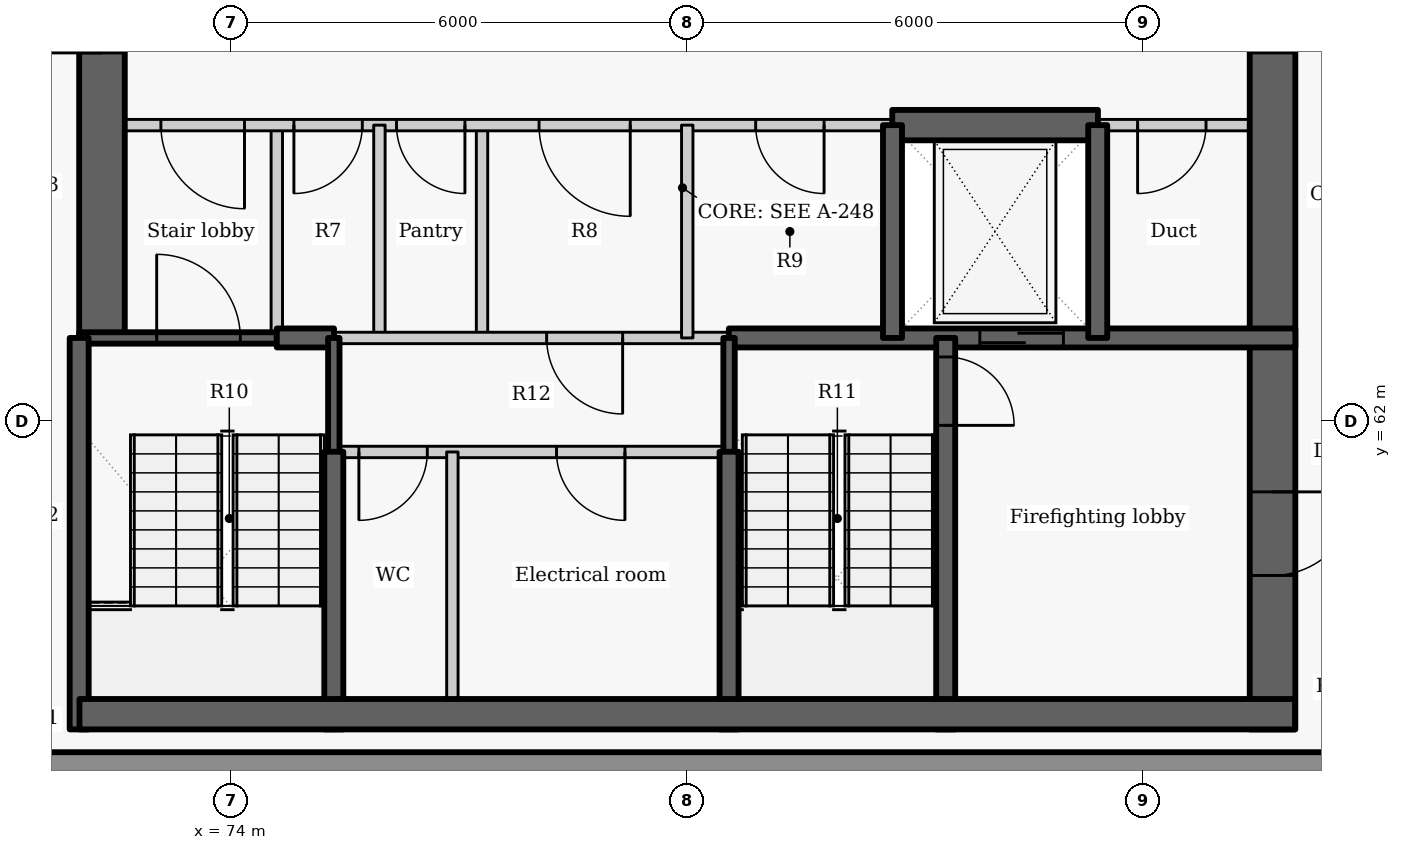
"""IFC4 building model, lengths in metres.
Left out: names, types, materials, properties, quantities, classifications, styles, units other than length and angle.
Written with IfcOpenShell. Run it as: python <this file> out.ifc"""

import sys

from ifc_helpers import new_model, si_unit, direction, frame, frame_2d, origin, place, context, subcontext, project, spatial, rectangle, extrude, element, fill, save


model = new_model("IFC4")
c1 = context("Model", 3, precision=1e-05, world=origin(), true_north=direction((0.0, 1.0)))
c2 = subcontext(c1, "Body", "Model", "MODEL_VIEW")
j1 = project(units=[si_unit("LENGTHUNIT", "METRE"), si_unit("PLANEANGLEUNIT", "RADIAN")], contexts=[c1])
p1 = place(None, origin())
s1 = spatial("IfcSite", under=j1, at=p1, CompositionType="ELEMENT")
p2 = place(p1, origin())
s2 = spatial("IfcBuilding", under=s1, at=p2, CompositionType="ELEMENT")
p3 = place(p2, frame((0.0, 0.0, 283.2)))
s3 = spatial("IfcBuildingStorey", under=s2, at=p3, CompositionType="ELEMENT", Elevation=283.2)
p4 = place(p3, frame((70.451, 57.5, 0.0), z_axis=(0.0, 0.0, 1.0), x_axis=(1.0, 0.0, 0.0)))
e1 = element("IfcWall", 1, at=p4, inside=s3, PredefinedType="SOLIDWALL", context=c2, shape_type="SweptSolid", body=[
    extrude(rectangle(XDim=19.093, YDim=0.3, at=frame_2d((9.546, 0.0))), origin(), (0.0, 0.0, 1.0), 2.725),
])
p5 = place(p3, frame((74.6, 63.1, 0.0), z_axis=(0.0, 0.0, 1.0), x_axis=(0.0, 1.0, 0.0)))
e2 = element("IfcWall", 2, at=p5, inside=s3, PredefinedType="PARTITIONING", context=c2, shape_type="SweptSolid", body=[
    extrude(rectangle(XDim=2.8, YDim=0.15, at=frame_2d((1.4, 0.0))), origin(), (0.0, 0.0, 1.0), 3.325),
])
p6 = place(p3, frame((72.3, 63.1, -0.275), z_axis=(0.0, 0.0, 1.0), x_axis=(0.0, 1.0, 0.0)))
e3 = element("IfcWall", 3, at=p6, inside=s3, PredefinedType="SHEAR", context=c2, shape_type="SweptSolid", body=[
    extrude(rectangle(XDim=9.1, YDim=0.6, at=frame_2d((4.55, 0.0))), origin(), (0.0, 0.0, 1.0), 3.6),
])
p7 = place(p6, frame((3.75, 0.0, 0.275)))
e4 = element("IfcOpeningElement", 4, at=p7, cuts=e3, PredefinedType="OPENING", context=c2, shape_type="SweptSolid", body=[
    extrude(rectangle(XDim=1.5, YDim=2.1, at=frame_2d((0.75, 1.05))), frame((0.0, 0.31, 0.0), z_axis=(0.0, -1.0, 0.0), x_axis=(1.0, 0.0, 0.0)), (0.0, 0.0, 1.0), 0.62),
])
p8 = place(p3, frame((77.3, 63.1, 0.0), z_axis=(0.0, 0.0, 1.0), x_axis=(0.0, 1.0, 0.0)))
e5 = element("IfcWall", 5, at=p8, inside=s3, PredefinedType="PARTITIONING", context=c2, shape_type="SweptSolid", body=[
    extrude(rectangle(XDim=2.8, YDim=0.15, at=frame_2d((1.4, 0.0))), origin(), (0.0, 0.0, 1.0), 3.325),
])
p9 = place(p3, frame((82.703, 65.9, 0.0), z_axis=(0.0, 0.0, 1.0), x_axis=(-1.0, 0.0, 0.0)))
e6 = element("IfcWall", 6, at=p9, inside=s3, PredefinedType="PARTITIONING", context=c2, shape_type="SweptSolid", body=[
    extrude(rectangle(XDim=10.703, YDim=0.15, at=frame_2d((5.352, 0.0))), origin(), (0.0, 0.0, 1.0), 3.325),
])
p10 = place(p9, frame((8.528, 0.0, 0.0)))
e7 = element("IfcOpeningElement", 7, at=p10, cuts=e6, PredefinedType="OPENING", context=c2, shape_type="SweptSolid", body=[
    extrude(rectangle(XDim=1.1, YDim=2.1, at=frame_2d((0.55, 1.05))), frame((0.0, 0.085, 0.0), z_axis=(0.0, -1.0, 0.0), x_axis=(1.0, 0.0, 0.0)), (0.0, 0.0, 1.0), 0.17),
])
p11 = place(p9, frame((6.978, 0.0, 0.0)))
e8 = element("IfcOpeningElement", 8, at=p11, cuts=e6, PredefinedType="OPENING", context=c2, shape_type="SweptSolid", body=[
    extrude(rectangle(XDim=0.9, YDim=2.1, at=frame_2d((0.45, 1.05))), frame((0.0, 0.085, 0.0), z_axis=(0.0, -1.0, 0.0), x_axis=(1.0, 0.0, 0.0)), (0.0, 0.0, 1.0), 0.17),
])
p12 = place(p9, frame((5.628, 0.0, 0.0)))
e9 = element("IfcOpeningElement", 9, at=p12, cuts=e6, PredefinedType="OPENING", context=c2, shape_type="SweptSolid", body=[
    extrude(rectangle(XDim=0.9, YDim=2.1, at=frame_2d((0.45, 1.05))), frame((0.0, 0.085, 0.0), z_axis=(0.0, -1.0, 0.0), x_axis=(1.0, 0.0, 0.0)), (0.0, 0.0, 1.0), 0.17),
])
p13 = place(p9, frame((3.453, 0.0, 0.0)))
e10 = element("IfcOpeningElement", 10, at=p13, cuts=e6, PredefinedType="OPENING", context=c2, shape_type="SweptSolid", body=[
    extrude(rectangle(XDim=1.2, YDim=2.1, at=frame_2d((0.6, 1.05))), frame((0.0, 0.085, 0.0), z_axis=(0.0, -1.0, 0.0), x_axis=(1.0, 0.0, 0.0)), (0.0, 0.0, 1.0), 0.17),
])
p14 = place(p9, frame((0.903, 0.0, 0.0)))
e11 = element("IfcOpeningElement", 11, at=p14, cuts=e6, PredefinedType="OPENING", context=c2, shape_type="SweptSolid", body=[
    extrude(rectangle(XDim=0.9, YDim=2.1, at=frame_2d((0.45, 1.05))), frame((0.0, 0.085, 0.0), z_axis=(0.0, -1.0, 0.0), x_axis=(1.0, 0.0, 0.0)), (0.0, 0.0, 1.0), 0.17),
])
p15 = place(p3, frame((88.0, 65.9, 0.0), z_axis=(0.0, 0.0, 1.0), x_axis=(-1.0, 0.0, 0.0)))
e12 = element("IfcWall", 12, at=p15, inside=s3, PredefinedType="PARTITIONING", context=c2, shape_type="SweptSolid", body=[
    extrude(rectangle(XDim=2.603, YDim=0.15, at=frame_2d((1.302, 0.0))), origin(), (0.0, 0.0, 1.0), 3.325),
])
p16 = place(p15, frame((1.175, 0.0, 0.0)))
e13 = element("IfcOpeningElement", 13, at=p16, cuts=e12, PredefinedType="OPENING", context=c2, shape_type="SweptSolid", body=[
    extrude(rectangle(XDim=0.9, YDim=2.1, at=frame_2d((0.45, 1.05))), frame((0.0, 0.085, 0.0), z_axis=(0.0, -1.0, 0.0), x_axis=(1.0, 0.0, 0.0)), (0.0, 0.0, 1.0), 0.17),
])
p17 = place(p3, frame((82.697, 65.9, -0.275), z_axis=(0.0, 0.0, 1.0), x_axis=(1.0, 0.0, 0.0)))
e14 = element("IfcWall", 14, at=p17, inside=s3, PredefinedType="SHEAR", context=c2, shape_type="SweptSolid", body=[
    extrude(rectangle(XDim=2.706, YDim=0.4, at=frame_2d((1.353, 0.0))), origin(), (0.0, 0.0, 1.0), 3.6),
])
p18 = place(p3, frame((87.7, 69.3, -0.275), z_axis=(0.0, 0.0, 1.0), x_axis=(0.0, -1.0, 0.0)))
e15 = element("IfcWall", 15, at=p18, inside=s3, PredefinedType="SHEAR", context=c2, shape_type="SweptSolid", body=[
    extrude(rectangle(XDim=11.35, YDim=0.6, at=frame_2d((5.675, 0.0))), origin(), (0.0, 0.0, 1.0), 3.6),
])
p19 = place(p18, frame((0.95, 0.0, 0.275)))
e16 = element("IfcOpeningElement", 16, at=p19, cuts=e15, PredefinedType="OPENING", context=c2, shape_type="SweptSolid", body=[
    extrude(rectangle(XDim=1.5, YDim=2.1, at=frame_2d((0.75, 1.05))), frame((0.0, 0.31, 0.0), z_axis=(0.0, -1.0, 0.0), x_axis=(1.0, 0.0, 0.0)), (0.0, 0.0, 1.0), 0.62),
])
p20 = place(p18, frame((8.225, 0.0, 0.275)))
e17 = element("IfcOpeningElement", 17, at=p20, cuts=e15, PredefinedType="OPENING", context=c2, shape_type="SweptSolid", body=[
    extrude(rectangle(XDim=1.1, YDim=2.1, at=frame_2d((0.55, 1.05))), frame((0.0, 0.31, 0.0), z_axis=(0.0, -1.0, 0.0), x_axis=(1.0, 0.0, 0.0)), (0.0, 0.0, 1.0), 0.62),
])
p21 = place(p3, frame((72.0, 63.1, -0.275), z_axis=(0.0, 0.0, 1.0), x_axis=(1.0, 0.0, 0.0)))
e18 = element("IfcWall", 18, at=p21, inside=s3, PredefinedType="SHEAR", context=c2, shape_type="SweptSolid", body=[
    extrude(rectangle(XDim=2.6, YDim=0.15, at=frame_2d((1.3, 0.0))), origin(), (0.0, 0.0, 1.0), 3.6),
])
p22 = place(p21, frame((1.02, 0.0, 0.275)))
e19 = element("IfcOpeningElement", 19, at=p22, cuts=e18, PredefinedType="OPENING", context=c2, shape_type="SweptSolid", body=[
    extrude(rectangle(XDim=1.1, YDim=2.1, at=frame_2d((0.55, 1.05))), frame((0.0, 0.085, 0.0), z_axis=(0.0, -1.0, 0.0), x_axis=(1.0, 0.0, 0.0)), (0.0, 0.0, 1.0), 0.17),
])
p23 = place(p3, frame((75.95, 63.1, 0.0), z_axis=(0.0, 0.0, 1.0), x_axis=(0.0, 1.0, 0.0)))
e20 = element("IfcWall", 20, at=p23, inside=s3, PredefinedType="PARTITIONING", context=c2, shape_type="SweptSolid", body=[
    extrude(rectangle(XDim=2.8, YDim=0.15, at=frame_2d((1.4, 0.0))), origin(), (0.0, 0.0, 1.0), 3.325),
])
p24 = place(p3, frame((74.6, 63.1, -0.275), z_axis=(0.0, 0.0, 1.0), x_axis=(1.0, 0.0, 0.0)))
e21 = element("IfcWall", 21, at=p24, inside=s3, PredefinedType="SHEAR", context=c2, shape_type="SweptSolid", body=[
    extrude(rectangle(XDim=0.753, YDim=0.25, at=frame_2d((0.376, 0.0))), origin(), (0.0, 0.0, 1.0), 3.6),
])
p25 = place(p3, frame((80.547, 63.1, -0.275), z_axis=(0.0, 0.0, 1.0), x_axis=(1.0, 0.0, 0.0)))
e22 = element("IfcWall", 22, at=p25, inside=s3, PredefinedType="SHEAR", context=c2, shape_type="SweptSolid", body=[
    extrude(rectangle(XDim=7.453, YDim=0.25, at=frame_2d((3.727, 0.0))), origin(), (0.0, 0.0, 1.0), 3.6),
])
p26 = place(p25, frame((3.302, 0.0, 0.275)))
e23 = element("IfcOpeningElement", 23, at=p26, cuts=e22, PredefinedType="OPENING", context=c2, shape_type="SweptSolid", body=[
    extrude(rectangle(XDim=1.1, YDim=2.1, at=frame_2d((0.55, 1.05))), frame((0.0, 0.135, 0.0), z_axis=(0.0, -1.0, 0.0), x_axis=(1.0, 0.0, 0.0)), (0.0, 0.0, 1.0), 0.27),
])
p27 = place(p3, frame((80.553, 63.1, 0.0), z_axis=(0.0, 0.0, 1.0), x_axis=(-1.0, 0.0, 0.0)))
e24 = element("IfcWall", 24, at=p27, inside=s3, PredefinedType="PARTITIONING", context=c2, shape_type="SweptSolid", body=[
    extrude(rectangle(XDim=5.206, YDim=0.15, at=frame_2d((2.603, 0.0))), origin(), (0.0, 0.0, 1.0), 3.325),
])
p28 = place(p27, frame((1.403, 0.0, 0.0)))
e25 = element("IfcOpeningElement", 25, at=p28, cuts=e24, PredefinedType="OPENING", context=c2, shape_type="SweptSolid", body=[
    extrude(rectangle(XDim=1.0, YDim=2.1, at=frame_2d((0.5, 1.05))), frame((0.0, 0.085, 0.0), z_axis=(0.0, -1.0, 0.0), x_axis=(1.0, 0.0, 0.0)), (0.0, 0.0, 1.0), 0.17),
])
p29 = place(p3, frame((80.0, 63.1, 0.0), z_axis=(0.0, 0.0, 1.0), x_axis=(0.0, 1.0, 0.0)))
e26 = element("IfcWall", 26, at=p29, inside=s3, PredefinedType="PARTITIONING", context=c2, shape_type="SweptSolid", body=[
    extrude(rectangle(XDim=2.8, YDim=0.15, at=frame_2d((1.4, 0.0))), origin(), (0.0, 0.0, 1.0), 3.325),
])
for number, where, z_axis, x_axis in (
    (27, (82.7, 63.1, -0.275), (0.0, 0.0, 1.0), (0.0, 1.0, 0.0)),
    (28, (85.4, 63.1, -0.275), (0.0, 0.0, 1.0), (0.0, 1.0, 0.0)),
):
    element("IfcWall", number, at=place(p3, frame(where, z_axis=z_axis, x_axis=x_axis)), inside=s3, PredefinedType="SHEAR", context=c2, shape_type="SweptSolid", body=[
        extrude(rectangle(XDim=2.8, YDim=0.25, at=frame_2d((1.4, 0.0))), origin(), (0.0, 0.0, 1.0), 3.6),
    ])
p30 = place(p3, frame((75.35, 61.597, -0.275), z_axis=(0.0, 0.0, 1.0), x_axis=(0.0, 1.0, 0.0)))
e29 = element("IfcWall", 29, at=p30, inside=s3, PredefinedType="SHEAR", context=c2, shape_type="SweptSolid", body=[
    extrude(rectangle(XDim=1.503, YDim=0.15, at=frame_2d((0.751, 0.0))), origin(), (0.0, 0.0, 1.0), 3.6),
])
p31 = place(p3, frame((75.35, 57.95, -0.275), z_axis=(0.0, 0.0, 1.0), x_axis=(0.0, 1.0, 0.0)))
e30 = element("IfcWall", 30, at=p31, inside=s3, PredefinedType="SHEAR", context=c2, shape_type="SweptSolid", body=[
    extrude(rectangle(XDim=3.653, YDim=0.25, at=frame_2d((1.827, 0.0))), origin(), (0.0, 0.0, 1.0), 3.6),
])
p32 = place(p3, frame((72.0, 57.95, -0.275), z_axis=(0.0, 0.0, 1.0), x_axis=(0.0, 1.0, 0.0)))
e31 = element("IfcWall", 31, at=p32, inside=s3, PredefinedType="SHEAR", context=c2, shape_type="SweptSolid", body=[
    extrude(rectangle(XDim=5.15, YDim=0.25, at=frame_2d((2.575, 0.0))), origin(), (0.0, 0.0, 1.0), 3.6),
])
p33 = place(p3, frame((83.4, 63.1, -0.275), z_axis=(0.0, 0.0, 1.0), x_axis=(0.0, -1.0, 0.0)))
e32 = element("IfcWall", 32, at=p33, inside=s3, PredefinedType="SHEAR", context=c2, shape_type="SweptSolid", body=[
    extrude(rectangle(XDim=5.15, YDim=0.25, at=frame_2d((2.575, 0.0))), origin(), (0.0, 0.0, 1.0), 3.6),
])
p34 = place(p33, frame((0.25, 0.0, 0.275)))
e33 = element("IfcOpeningElement", 33, at=p34, cuts=e32, PredefinedType="OPENING", context=c2, shape_type="SweptSolid", body=[
    extrude(rectangle(XDim=0.9, YDim=2.1, at=frame_2d((0.45, 1.05))), frame((0.0, 0.135, 0.0), z_axis=(0.0, -1.0, 0.0), x_axis=(1.0, 0.0, 0.0)), (0.0, 0.0, 1.0), 0.27),
])
p35 = place(p3, frame((80.55, 61.597, -0.275), z_axis=(0.0, 0.0, 1.0), x_axis=(0.0, 1.0, 0.0)))
e34 = element("IfcWall", 34, at=p35, inside=s3, PredefinedType="SHEAR", context=c2, shape_type="SweptSolid", body=[
    extrude(rectangle(XDim=1.503, YDim=0.15, at=frame_2d((0.751, 0.0))), origin(), (0.0, 0.0, 1.0), 3.6),
])
p36 = place(p3, frame((80.55, 57.95, -0.275), z_axis=(0.0, 0.0, 1.0), x_axis=(0.0, 1.0, 0.0)))
e35 = element("IfcWall", 35, at=p36, inside=s3, PredefinedType="SHEAR", context=c2, shape_type="SweptSolid", body=[
    extrude(rectangle(XDim=3.653, YDim=0.25, at=frame_2d((1.827, 0.0))), origin(), (0.0, 0.0, 1.0), 3.6),
])
p37 = place(p3, frame((80.55, 61.6, 0.0), z_axis=(0.0, 0.0, 1.0), x_axis=(-1.0, 0.0, 0.0)))
e36 = element("IfcWall", 36, at=p37, inside=s3, PredefinedType="PARTITIONING", context=c2, shape_type="SweptSolid", body=[
    extrude(rectangle(XDim=5.2, YDim=0.15, at=frame_2d((2.6, 0.0))), origin(), (0.0, 0.0, 1.0), 3.325),
])
p38 = place(p37, frame((3.97, 0.0, 0.0)))
e37 = element("IfcOpeningElement", 37, at=p38, cuts=e36, PredefinedType="OPENING", context=c2, shape_type="SweptSolid", body=[
    extrude(rectangle(XDim=0.9, YDim=2.1, at=frame_2d((0.45, 1.05))), frame((0.0, 0.085, 0.0), z_axis=(0.0, -1.0, 0.0), x_axis=(1.0, 0.0, 0.0)), (0.0, 0.0, 1.0), 0.17),
])
p39 = place(p37, frame((1.37, 0.0, 0.0)))
e38 = element("IfcOpeningElement", 38, at=p39, cuts=e36, PredefinedType="OPENING", context=c2, shape_type="SweptSolid", body=[
    extrude(rectangle(XDim=0.9, YDim=2.1, at=frame_2d((0.45, 1.05))), frame((0.0, 0.085, 0.0), z_axis=(0.0, -1.0, 0.0), x_axis=(1.0, 0.0, 0.0)), (0.0, 0.0, 1.0), 0.17),
])
p40 = place(p3, frame((76.91, 57.95, 0.0), z_axis=(0.0, 0.0, 1.0), x_axis=(0.0, 1.0, 0.0)))
e39 = element("IfcWall", 39, at=p40, inside=s3, PredefinedType="PARTITIONING", context=c2, shape_type="SweptSolid", body=[
    extrude(rectangle(XDim=3.65, YDim=0.15, at=frame_2d((1.825, 0.0))), origin(), (0.0, 0.0, 1.0), 3.325),
])
p41 = place(p3, frame((72.004, 58.15, -0.275), z_axis=(0.0, 0.0, 1.0), x_axis=(1.0, 0.0, 0.0)))
e40 = element("IfcWall", 40, at=p41, inside=s3, PredefinedType="SHEAR", context=c2, shape_type="SweptSolid", body=[
    extrude(rectangle(XDim=15.992, YDim=0.4, at=frame_2d((7.996, 0.0))), origin(), (0.0, 0.0, 1.0), 3.6),
])
p42 = place(p10, origin())
e41 = element("IfcDoor", 41, at=p42, inside=s3, OperationType="SINGLE_SWING_LEFT", PredefinedType="DOOR", context=c2, shape_type="SweptSolid", body=[
    extrude(rectangle(XDim=1.1, YDim=2.1, at=frame_2d((0.55, 1.05))), frame((0.0, 0.025, 0.0), z_axis=(0.0, -1.0, 0.0), x_axis=(1.0, 0.0, 0.0)), (0.0, 0.0, 1.0), 0.05),
])
fill(e7, e41)
p43 = place(p11, origin())
e42 = element("IfcDoor", 42, at=p43, inside=s3, OperationType="SINGLE_SWING_RIGHT", PredefinedType="DOOR", context=c2, shape_type="SweptSolid", body=[
    extrude(rectangle(XDim=0.9, YDim=2.1, at=frame_2d((0.45, 1.05))), frame((0.0, 0.025, 0.0), z_axis=(0.0, -1.0, 0.0), x_axis=(1.0, 0.0, 0.0)), (0.0, 0.0, 1.0), 0.05),
])
fill(e8, e42)
p44 = place(p12, origin())
e43 = element("IfcDoor", 43, at=p44, inside=s3, OperationType="SINGLE_SWING_LEFT", PredefinedType="DOOR", context=c2, shape_type="SweptSolid", body=[
    extrude(rectangle(XDim=0.9, YDim=2.1, at=frame_2d((0.45, 1.05))), frame((0.0, 0.025, 0.0), z_axis=(0.0, -1.0, 0.0), x_axis=(1.0, 0.0, 0.0)), (0.0, 0.0, 1.0), 0.05),
])
fill(e9, e43)
p45 = place(p13, origin())
e44 = element("IfcDoor", 44, at=p45, inside=s3, OperationType="DOUBLE_DOOR_SINGLE_SWING", PredefinedType="DOOR", context=c2, shape_type="SweptSolid", body=[
    extrude(rectangle(XDim=1.2, YDim=2.1, at=frame_2d((0.6, 1.05))), frame((0.0, 0.025, 0.0), z_axis=(0.0, -1.0, 0.0), x_axis=(1.0, 0.0, 0.0)), (0.0, 0.0, 1.0), 0.05),
])
fill(e10, e44)
p46 = place(p14, origin())
e45 = element("IfcDoor", 45, at=p46, inside=s3, OperationType="SINGLE_SWING_LEFT", PredefinedType="DOOR", context=c2, shape_type="SweptSolid", body=[
    extrude(rectangle(XDim=0.9, YDim=2.1, at=frame_2d((0.45, 1.05))), frame((0.0, 0.025, 0.0), z_axis=(0.0, -1.0, 0.0), x_axis=(1.0, 0.0, 0.0)), (0.0, 0.0, 1.0), 0.05),
])
fill(e11, e45)
p47 = place(p26, origin())
e46 = element("IfcDoor", 46, at=p47, inside=s3, OperationType="SLIDING_TO_LEFT", PredefinedType="DOOR", context=c2, shape_type="SweptSolid", body=[
    extrude(rectangle(XDim=1.1, YDim=2.1, at=frame_2d((0.55, 1.05))), frame((0.0, 0.025, 0.0), z_axis=(0.0, -1.0, 0.0), x_axis=(1.0, 0.0, 0.0)), (0.0, 0.0, 1.0), 0.05),
])
fill(e23, e46)
p48 = place(p16, origin())
e47 = element("IfcDoor", 47, at=p48, inside=s3, OperationType="SINGLE_SWING_RIGHT", PredefinedType="DOOR", context=c2, shape_type="SweptSolid", body=[
    extrude(rectangle(XDim=0.9, YDim=2.1, at=frame_2d((0.45, 1.05))), frame((0.0, 0.025, 0.0), z_axis=(0.0, -1.0, 0.0), x_axis=(1.0, 0.0, 0.0)), (0.0, 0.0, 1.0), 0.05),
])
fill(e13, e47)
p49 = place(p28, origin())
e48 = element("IfcDoor", 48, at=p49, inside=s3, OperationType="SINGLE_SWING_LEFT", PredefinedType="DOOR", context=c2, shape_type="SweptSolid", body=[
    extrude(rectangle(XDim=1.0, YDim=2.1, at=frame_2d((0.5, 1.05))), frame((0.0, 0.025, 0.0), z_axis=(0.0, -1.0, 0.0), x_axis=(1.0, 0.0, 0.0)), (0.0, 0.0, 1.0), 0.05),
])
fill(e25, e48)
p50 = place(p38, origin())
e49 = element("IfcDoor", 49, at=p50, inside=s3, OperationType="SINGLE_SWING_RIGHT", PredefinedType="DOOR", context=c2, shape_type="SweptSolid", body=[
    extrude(rectangle(XDim=0.9, YDim=2.1, at=frame_2d((0.45, 1.05))), frame((0.0, 0.025, 0.0), z_axis=(0.0, -1.0, 0.0), x_axis=(1.0, 0.0, 0.0)), (0.0, 0.0, 1.0), 0.05),
])
fill(e37, e49)
p51 = place(p39, origin())
e50 = element("IfcDoor", 50, at=p51, inside=s3, OperationType="SINGLE_SWING_LEFT", PredefinedType="DOOR", context=c2, shape_type="SweptSolid", body=[
    extrude(rectangle(XDim=0.9, YDim=2.1, at=frame_2d((0.45, 1.05))), frame((0.0, 0.025, 0.0), z_axis=(0.0, -1.0, 0.0), x_axis=(1.0, 0.0, 0.0)), (0.0, 0.0, 1.0), 0.05),
])
fill(e38, e50)
p52 = place(p22, origin())
e51 = element("IfcDoor", 51, at=p52, inside=s3, OperationType="SINGLE_SWING_LEFT", PredefinedType="DOOR", context=c2, shape_type="SweptSolid", body=[
    extrude(rectangle(XDim=1.1, YDim=2.1, at=frame_2d((0.55, 1.05))), frame((0.0, 0.025, 0.0), z_axis=(0.0, -1.0, 0.0), x_axis=(1.0, 0.0, 0.0)), (0.0, 0.0, 1.0), 0.05),
])
fill(e19, e51)
p53 = place(p34, origin())
e52 = element("IfcDoor", 52, at=p53, inside=s3, OperationType="SINGLE_SWING_RIGHT", PredefinedType="DOOR", context=c2, shape_type="SweptSolid", body=[
    extrude(rectangle(XDim=0.9, YDim=2.1, at=frame_2d((0.45, 1.05))), frame((0.0, 0.025, 0.0), z_axis=(0.0, -1.0, 0.0), x_axis=(1.0, 0.0, 0.0)), (0.0, 0.0, 1.0), 0.05),
])
fill(e33, e52)
p54 = place(p20, origin())
e53 = element("IfcDoor", 53, at=p54, inside=s3, OperationType="SINGLE_SWING_LEFT", PredefinedType="DOOR", context=c2, shape_type="SweptSolid", body=[
    extrude(rectangle(XDim=1.1, YDim=2.1, at=frame_2d((0.55, 1.05))), frame((0.0, 0.025, 0.0), z_axis=(0.0, -1.0, 0.0), x_axis=(1.0, 0.0, 0.0)), (0.0, 0.0, 1.0), 0.05),
])
fill(e17, e53)
save(model, sys.argv[1])
